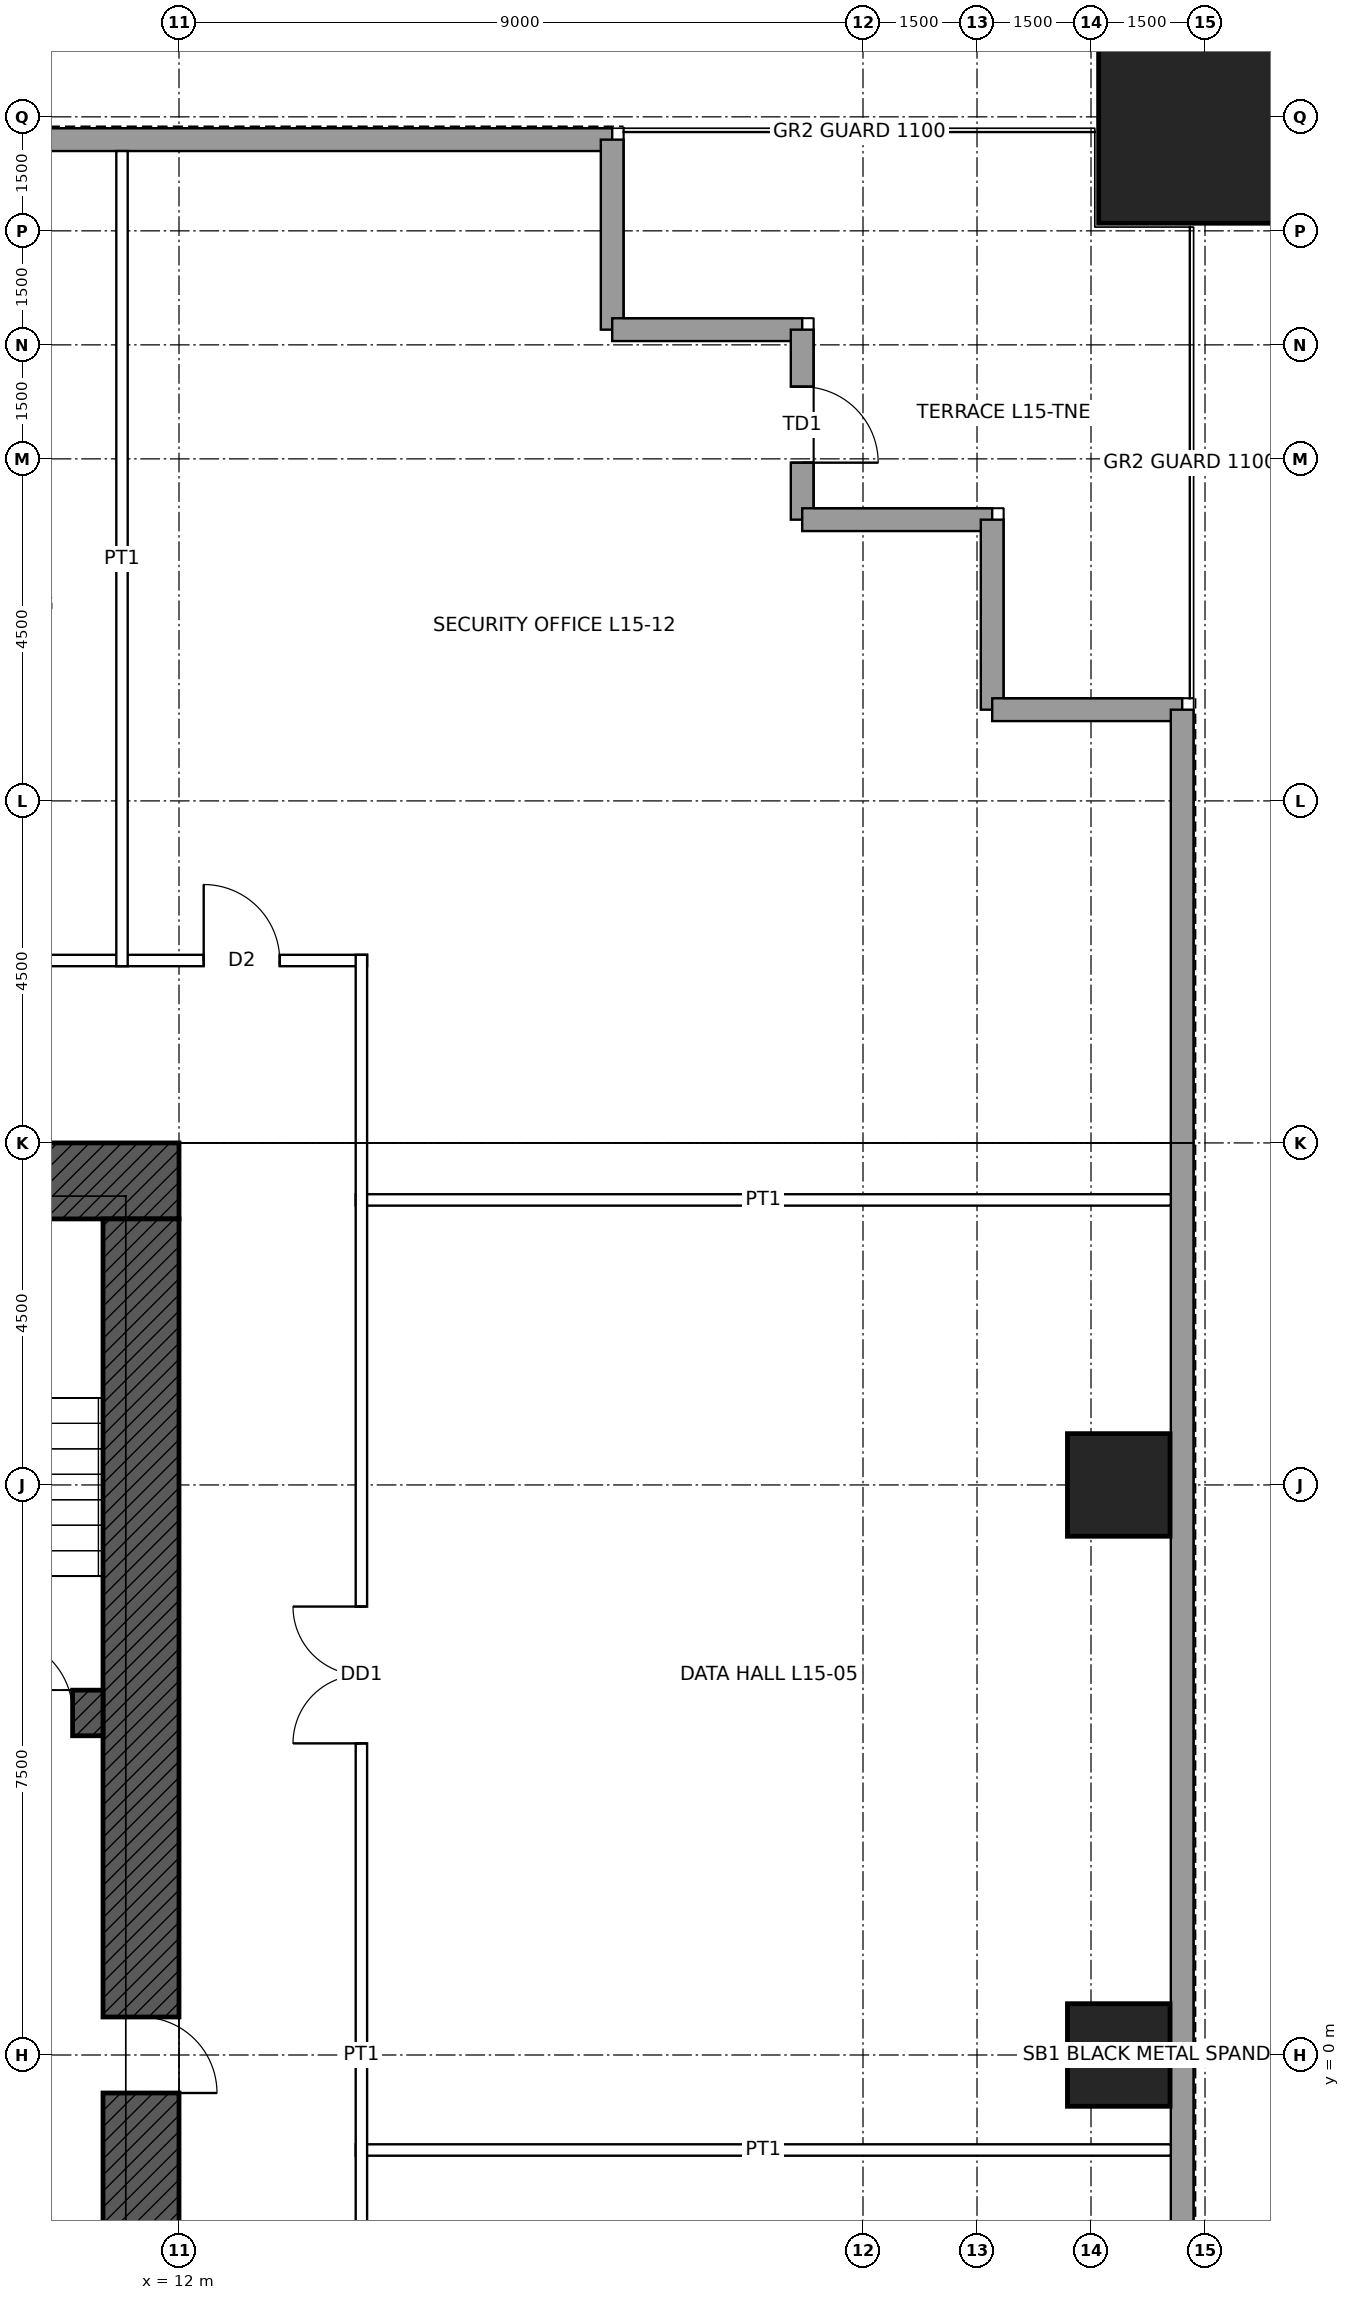
"""IFC4 building model, lengths in metres.
Left out: names, types, materials, properties, quantities, classifications, styles, units other than length and angle.
Written with IfcOpenShell. Run it as: python <this file> out.ifc"""

import sys

from ifc_helpers import new_model, si_unit, direction, frame, frame_2d, origin, origin_2d, place, context, subcontext, project, spatial, rectangle, hollow_rectangle, extrude, element, fill, save


model = new_model("IFC4")
c1 = context("Model", 3, precision=1e-05, world=origin(), true_north=direction((0.0, 1.0)))
c2 = subcontext(c1, "Body", "Model", "MODEL_VIEW")
j1 = project(units=[si_unit("LENGTHUNIT", "METRE"), si_unit("PLANEANGLEUNIT", "RADIAN")], contexts=[c1])
p1 = place(None, origin())
s1 = spatial("IfcSite", under=j1, at=p1, CompositionType="ELEMENT")
p2 = place(p1, origin())
s2 = spatial("IfcBuilding", under=s1, at=p2, CompositionType="ELEMENT")
p3 = place(p2, frame((0.0, 0.0, 78.4)))
s3 = spatial("IfcBuildingStorey", under=s2, at=p3, CompositionType="ELEMENT", Elevation=78.4)
p4 = place(p3, frame((25.5, 25.5, 0.0), z_axis=(0.0, 0.0, 1.0), x_axis=(1.0, 0.0, 0.0)))
e1 = element("IfcColumn", 1, at=p4, inside=s3, PredefinedType="COLUMN", context=c2, shape_type="SweptSolid", body=[
    extrude(hollow_rectangle(XDim=2.8, YDim=2.8, WallThickness=0.14, at=origin_2d()), origin(), (0.0, 0.0, 1.0), 5.0),
])
for number, where, z_axis, x_axis in (
    (2, (24.365, 7.5, 0.0), (0.0, 0.0, 1.0), (1.0, 0.0, 0.0)),
    (3, (24.365, 0.0, 0.0), (0.0, 0.0, 1.0), (1.0, 0.0, 0.0)),
):
    element("IfcColumn", number, at=place(p3, frame(where, z_axis=z_axis, x_axis=x_axis)), inside=s3, PredefinedType="COLUMN", context=c2, shape_type="SweptSolid", body=[
        extrude(hollow_rectangle(XDim=1.35, YDim=1.35, WallThickness=0.085, at=origin_2d()), origin(), (0.0, 0.0, 1.0), 5.0),
    ])
p5 = place(p3, frame((-12.0, 11.5, 0.0), z_axis=(0.0, 0.0, 1.0), x_axis=(1.0, 0.0, 0.0)))
e4 = element("IfcWall", 4, at=p5, inside=s3, PredefinedType="SHEAR", context=c2, shape_type="SweptSolid", body=[
    extrude(rectangle(XDim=24.0, YDim=1.0, at=frame_2d((12.0, 0.0))), origin(), (0.0, 0.0, 1.0), 5.0),
])
p6 = place(p5, frame((6.25, 0.0, 0.0)))
e5 = element("IfcOpeningElement", 5, at=p6, cuts=e4, PredefinedType="OPENING", context=c2, shape_type="SweptSolid", body=[
    extrude(rectangle(XDim=1.0, YDim=2.4, at=frame_2d((0.5, 1.2))), frame((0.0, 0.51, 0.0), z_axis=(0.0, -1.0, 0.0), x_axis=(1.0, 0.0, 0.0)), (0.0, 0.0, 1.0), 1.02),
])
p7 = place(p5, frame((16.75, 0.0, 0.0)))
e6 = element("IfcOpeningElement", 6, at=p7, cuts=e4, PredefinedType="OPENING", context=c2, shape_type="SweptSolid", body=[
    extrude(rectangle(XDim=1.0, YDim=2.4, at=frame_2d((0.5, 1.2))), frame((0.0, 0.51, 0.0), z_axis=(0.0, -1.0, 0.0), x_axis=(1.0, 0.0, 0.0)), (0.0, 0.0, 1.0), 1.02),
])
p8 = place(p3, frame((11.5, 11.0, 0.0), z_axis=(0.0, 0.0, 1.0), x_axis=(0.0, -1.0, 0.0)))
e7 = element("IfcWall", 7, at=p8, inside=s3, PredefinedType="SHEAR", context=c2, shape_type="SweptSolid", body=[
    extrude(rectangle(XDim=22.0, YDim=1.0, at=frame_2d((11.0, 0.0))), origin(), (0.0, 0.0, 1.0), 5.0),
])
p9 = place(p8, frame((10.5, 0.0, 0.0)))
e8 = element("IfcOpeningElement", 8, at=p9, cuts=e7, PredefinedType="OPENING", context=c2, shape_type="SweptSolid", body=[
    extrude(rectangle(XDim=1.0, YDim=2.4, at=frame_2d((0.5, 1.2))), frame((0.0, 0.51, 0.0), z_axis=(0.0, -1.0, 0.0), x_axis=(1.0, 0.0, 0.0)), (0.0, 0.0, 1.0), 1.02),
])
p10 = place(p3, frame((-11.0, 4.5, 0.0), z_axis=(0.0, 0.0, 1.0), x_axis=(1.0, 0.0, 0.0)))
e9 = element("IfcWall", 9, at=p10, inside=s3, PredefinedType="SHEAR", context=c2, shape_type="SweptSolid", body=[
    extrude(rectangle(XDim=22.0, YDim=0.6, at=frame_2d((11.0, 0.0))), origin(), (0.0, 0.0, 1.0), 5.0),
])
p11 = place(p10, frame((0.4, 0.0, 0.0)))
e10 = element("IfcOpeningElement", 10, at=p11, cuts=e9, PredefinedType="OPENING", context=c2, shape_type="SweptSolid", body=[
    extrude(rectangle(XDim=1.0, YDim=2.1, at=frame_2d((0.5, 1.05))), frame((0.0, 0.31, 0.0), z_axis=(0.0, -1.0, 0.0), x_axis=(1.0, 0.0, 0.0)), (0.0, 0.0, 1.0), 0.62),
])
p12 = place(p10, frame((20.6, 0.0, 0.0)))
e11 = element("IfcOpeningElement", 11, at=p12, cuts=e9, PredefinedType="OPENING", context=c2, shape_type="SweptSolid", body=[
    extrude(rectangle(XDim=1.0, YDim=2.1, at=frame_2d((0.5, 1.05))), frame((0.0, 0.31, 0.0), z_axis=(0.0, -1.0, 0.0), x_axis=(1.0, 0.0, 0.0)), (0.0, 0.0, 1.0), 0.62),
])
p13 = place(p3, frame((-17.7, 25.2, 0.0), z_axis=(0.0, 0.0, 1.0), x_axis=(1.0, 0.0, 0.0)))
e12 = element("IfcWall", 12, at=p13, inside=s3, PredefinedType="SOLIDWALL", context=c2, shape_type="SweptSolid", body=[
    extrude(rectangle(XDim=35.4, YDim=0.3, at=frame_2d((17.7, 0.0))), origin(), (0.0, 0.0, 1.0), 4.8),
])
for number, where, z_axis, x_axis in (
    (13, (17.7, 25.2, 0.0), (0.0, 0.0, 1.0), (0.0, -1.0, 0.0)),
    (14, (17.7, 22.7, 0.0), (0.0, 0.0, 1.0), (1.0, 0.0, 0.0)),
):
    element("IfcWall", number, at=place(p3, frame(where, z_axis=z_axis, x_axis=x_axis)), inside=s3, PredefinedType="SOLIDWALL", context=c2, shape_type="SweptSolid", body=[
        extrude(rectangle(XDim=2.5, YDim=0.3, at=frame_2d((1.25, 0.0))), origin(), (0.0, 0.0, 1.0), 4.8),
    ])
p14 = place(p3, frame((20.2, 22.7, 0.0), z_axis=(0.0, 0.0, 1.0), x_axis=(0.0, -1.0, 0.0)))
e15 = element("IfcWall", 15, at=p14, inside=s3, PredefinedType="SOLIDWALL", context=c2, shape_type="SweptSolid", body=[
    extrude(rectangle(XDim=2.5, YDim=0.3, at=frame_2d((1.25, 0.0))), origin(), (0.0, 0.0, 1.0), 4.8),
])
p15 = place(p14, frame((0.75, 0.0, 0.0)))
e16 = element("IfcOpeningElement", 16, at=p15, cuts=e15, PredefinedType="OPENING", context=c2, shape_type="SweptSolid", body=[
    extrude(rectangle(XDim=1.0, YDim=2.4, at=frame_2d((0.5, 1.2))), frame((0.0, 0.16, 0.0), z_axis=(0.0, -1.0, 0.0), x_axis=(1.0, 0.0, 0.0)), (0.0, 0.0, 1.0), 0.32),
])
for number, where, z_axis, x_axis in (
    (17, (20.2, 20.2, 0.0), (0.0, 0.0, 1.0), (1.0, 0.0, 0.0)),
    (18, (22.7, 20.2, 0.0), (0.0, 0.0, 1.0), (0.0, -1.0, 0.0)),
    (19, (22.7, 17.7, 0.0), (0.0, 0.0, 1.0), (1.0, 0.0, 0.0)),
):
    element("IfcWall", number, at=place(p3, frame(where, z_axis=z_axis, x_axis=x_axis)), inside=s3, PredefinedType="SOLIDWALL", context=c2, shape_type="SweptSolid", body=[
        extrude(rectangle(XDim=2.5, YDim=0.3, at=frame_2d((1.25, 0.0))), origin(), (0.0, 0.0, 1.0), 4.8),
    ])
p16 = place(p3, frame((25.2, 17.7, 0.0), z_axis=(0.0, 0.0, 1.0), x_axis=(0.0, -1.0, 0.0)))
e20 = element("IfcWall", 20, at=p16, inside=s3, PredefinedType="SOLIDWALL", context=c2, shape_type="SweptSolid", body=[
    extrude(rectangle(XDim=35.4, YDim=0.3, at=frame_2d((17.7, 0.0))), origin(), (0.0, 0.0, 1.0), 4.8),
])
p17 = place(p3, frame((14.325, -1.25, 0.0), z_axis=(0.0, 0.0, 1.0), x_axis=(1.0, 0.0, 0.0)))
e21 = element("IfcWall", 21, at=p17, inside=s3, PredefinedType="PARTITIONING", context=c2, shape_type="SweptSolid", body=[
    extrude(rectangle(XDim=10.725, YDim=0.15, at=frame_2d((5.363, 0.0))), origin(), (0.0, 0.0, 1.0), 4.8),
])
p18 = place(p3, frame((14.325, 11.25, 0.0), z_axis=(0.0, 0.0, 1.0), x_axis=(1.0, 0.0, 0.0)))
e22 = element("IfcWall", 22, at=p18, inside=s3, PredefinedType="PARTITIONING", context=c2, shape_type="SweptSolid", body=[
    extrude(rectangle(XDim=10.725, YDim=0.15, at=frame_2d((5.363, 0.0))), origin(), (0.0, 0.0, 1.0), 3.853),
])
p19 = place(p3, frame((-14.475, 14.4, 0.0), z_axis=(0.0, 0.0, 1.0), x_axis=(1.0, 0.0, 0.0)))
e23 = element("IfcWall", 23, at=p19, inside=s3, PredefinedType="PARTITIONING", context=c2, shape_type="SweptSolid", body=[
    extrude(rectangle(XDim=28.95, YDim=0.15, at=frame_2d((14.475, 0.0))), origin(), (0.0, 0.0, 1.0), 4.8),
])
p20 = place(p19, frame((4.825, 0.0, 0.0)))
e24 = element("IfcOpeningElement", 24, at=p20, cuts=e23, PredefinedType="OPENING", context=c2, shape_type="SweptSolid", body=[
    extrude(rectangle(XDim=1.8, YDim=2.4, at=frame_2d((0.9, 1.2))), frame((0.0, 0.085, 0.0), z_axis=(0.0, -1.0, 0.0), x_axis=(1.0, 0.0, 0.0)), (0.0, 0.0, 1.0), 0.17),
])
p21 = place(p19, frame((13.575, 0.0, 0.0)))
e25 = element("IfcOpeningElement", 25, at=p21, cuts=e23, PredefinedType="OPENING", context=c2, shape_type="SweptSolid", body=[
    extrude(rectangle(XDim=1.8, YDim=2.4, at=frame_2d((0.9, 1.2))), frame((0.0, 0.085, 0.0), z_axis=(0.0, -1.0, 0.0), x_axis=(1.0, 0.0, 0.0)), (0.0, 0.0, 1.0), 0.17),
])
p22 = place(p19, frame((22.725, 0.0, 0.0)))
e26 = element("IfcOpeningElement", 26, at=p22, cuts=e23, PredefinedType="OPENING", context=c2, shape_type="SweptSolid", body=[
    extrude(rectangle(XDim=1.0, YDim=2.1, at=frame_2d((0.5, 1.05))), frame((0.0, 0.085, 0.0), z_axis=(0.0, -1.0, 0.0), x_axis=(1.0, 0.0, 0.0)), (0.0, 0.0, 1.0), 0.17),
])
p23 = place(p19, frame((26.8, 0.0, 0.0)))
e27 = element("IfcOpeningElement", 27, at=p23, cuts=e23, PredefinedType="OPENING", context=c2, shape_type="SweptSolid", body=[
    extrude(rectangle(XDim=1.0, YDim=2.1, at=frame_2d((0.5, 1.05))), frame((0.0, 0.085, 0.0), z_axis=(0.0, -1.0, 0.0), x_axis=(1.0, 0.0, 0.0)), (0.0, 0.0, 1.0), 0.17),
])
p24 = place(p19, frame((1.15, 0.0, 0.0)))
e28 = element("IfcOpeningElement", 28, at=p24, cuts=e23, PredefinedType="OPENING", context=c2, shape_type="SweptSolid", body=[
    extrude(rectangle(XDim=1.0, YDim=2.1, at=frame_2d((0.5, 1.05))), frame((0.0, 0.085, 0.0), z_axis=(0.0, -1.0, 0.0), x_axis=(1.0, 0.0, 0.0)), (0.0, 0.0, 1.0), 0.17),
])
p25 = place(p3, frame((11.25, 14.325, 0.0), z_axis=(0.0, 0.0, 1.0), x_axis=(0.0, 1.0, 0.0)))
e29 = element("IfcWall", 29, at=p25, inside=s3, PredefinedType="PARTITIONING", context=c2, shape_type="SweptSolid", body=[
    extrude(rectangle(XDim=10.725, YDim=0.15, at=frame_2d((5.363, 0.0))), origin(), (0.0, 0.0, 1.0), 3.853),
])
p26 = place(p3, frame((14.4, -14.475, 0.0), z_axis=(0.0, 0.0, 1.0), x_axis=(0.0, 1.0, 0.0)))
e30 = element("IfcWall", 30, at=p26, inside=s3, PredefinedType="PARTITIONING", context=c2, shape_type="SweptSolid", body=[
    extrude(rectangle(XDim=28.95, YDim=0.15, at=frame_2d((14.475, 0.0))), origin(), (0.0, 0.0, 1.0), 4.8),
])
p27 = place(p26, frame((18.575, 0.0, 0.0)))
e31 = element("IfcOpeningElement", 31, at=p27, cuts=e30, PredefinedType="OPENING", context=c2, shape_type="SweptSolid", body=[
    extrude(rectangle(XDim=1.8, YDim=2.4, at=frame_2d((0.9, 1.2))), frame((0.0, 0.085, 0.0), z_axis=(0.0, -1.0, 0.0), x_axis=(1.0, 0.0, 0.0)), (0.0, 0.0, 1.0), 0.17),
])
p28 = place(p26, frame((7.325, 0.0, 0.0)))
e32 = element("IfcOpeningElement", 32, at=p28, cuts=e30, PredefinedType="OPENING", context=c2, shape_type="SweptSolid", body=[
    extrude(rectangle(XDim=1.8, YDim=2.4, at=frame_2d((0.9, 1.2))), frame((0.0, 0.085, 0.0), z_axis=(0.0, -1.0, 0.0), x_axis=(1.0, 0.0, 0.0)), (0.0, 0.0, 1.0), 0.17),
])
p29 = place(p15, origin())
e33 = element("IfcDoor", 33, at=p29, inside=s3, OperationType="SINGLE_SWING_RIGHT", PredefinedType="DOOR", context=c2, shape_type="SweptSolid", body=[
    extrude(rectangle(XDim=1.0, YDim=2.4, at=frame_2d((0.5, 1.2))), frame((0.0, 0.025, 0.0), z_axis=(0.0, -1.0, 0.0), x_axis=(1.0, 0.0, 0.0)), (0.0, 0.0, 1.0), 0.05),
])
fill(e16, e33)
p30 = place(p12, origin())
e34 = element("IfcDoor", 34, at=p30, inside=s3, OperationType="SINGLE_SWING_LEFT", PredefinedType="DOOR", context=c2, shape_type="SweptSolid", body=[
    extrude(rectangle(XDim=1.0, YDim=2.1, at=frame_2d((0.5, 1.05))), frame((0.0, 0.025, 0.0), z_axis=(0.0, -1.0, 0.0), x_axis=(1.0, 0.0, 0.0)), (0.0, 0.0, 1.0), 0.05),
])
fill(e11, e34)
p31 = place(p9, origin())
e35 = element("IfcDoor", 35, at=p31, inside=s3, OperationType="SINGLE_SWING_RIGHT", PredefinedType="DOOR", context=c2, shape_type="SweptSolid", body=[
    extrude(rectangle(XDim=1.0, YDim=2.4, at=frame_2d((0.5, 1.2))), frame((0.0, 0.485, 0.0), z_axis=(0.0, -1.0, 0.0), x_axis=(1.0, 0.0, 0.0)), (0.0, 0.0, 1.0), 0.05),
])
fill(e8, e35)
p32 = place(p27, origin())
e36 = element("IfcDoor", 36, at=p32, inside=s3, OperationType="DOUBLE_DOOR_SINGLE_SWING", PredefinedType="DOOR", context=c2, shape_type="SweptSolid", body=[
    extrude(rectangle(XDim=1.8, YDim=2.4, at=frame_2d((0.9, 1.2))), frame((0.0, 0.025, 0.0), z_axis=(0.0, -1.0, 0.0), x_axis=(1.0, 0.0, 0.0)), (0.0, 0.0, 1.0), 0.05),
])
fill(e31, e36)
p33 = place(p23, origin())
e37 = element("IfcDoor", 37, at=p33, inside=s3, OperationType="SINGLE_SWING_LEFT", PredefinedType="DOOR", context=c2, shape_type="SweptSolid", body=[
    extrude(rectangle(XDim=1.0, YDim=2.1, at=frame_2d((0.5, 1.05))), frame((0.0, 0.025, 0.0), z_axis=(0.0, -1.0, 0.0), x_axis=(1.0, 0.0, 0.0)), (0.0, 0.0, 1.0), 0.05),
])
fill(e27, e37)
save(model, sys.argv[1])
